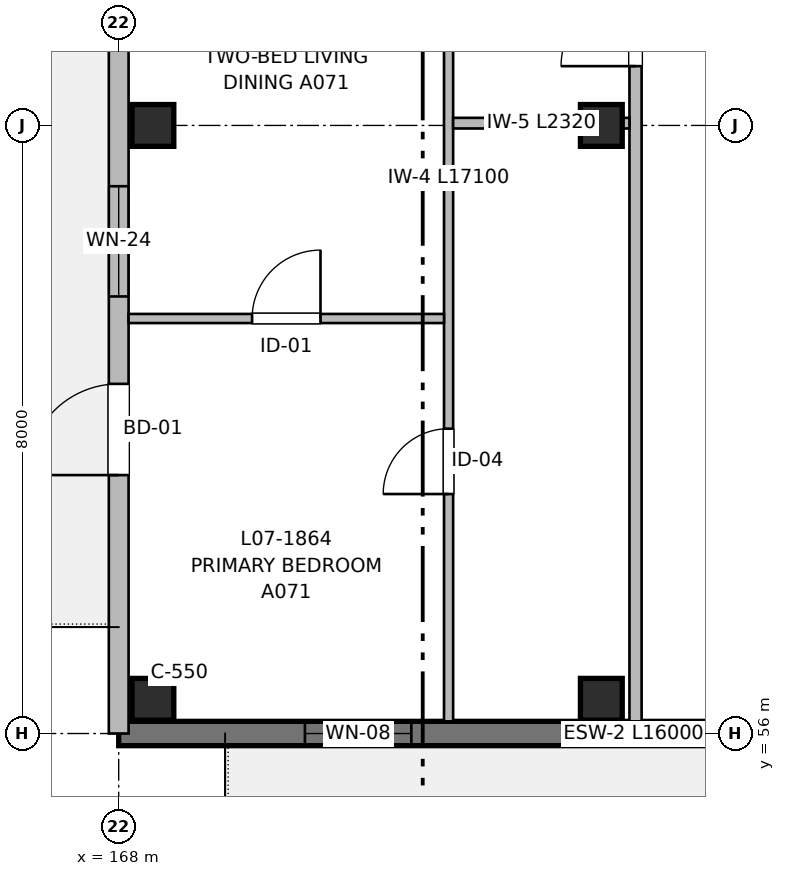
"""IFC4 building model, lengths in metres.
Left out: names, types, materials, properties, quantities, classifications, styles, units other than length and angle.
Written with IfcOpenShell. Run it as: python <this file> out.ifc"""

import sys

from ifc_helpers import new_model, si_unit, direction, frame, frame_2d, origin, origin_2d, place, context, subcontext, project, spatial, rectangle, extrude, element, fill, save


model = new_model("IFC4")
c1 = context("Model", 3, precision=1e-05, world=origin(), true_north=direction((0.0, 1.0)))
c2 = subcontext(c1, "Body", "Model", "MODEL_VIEW")
j1 = project(units=[si_unit("LENGTHUNIT", "METRE"), si_unit("PLANEANGLEUNIT", "RADIAN")], contexts=[c1])
p1 = place(None, origin())
s1 = spatial("IfcSite", under=j1, at=p1, CompositionType="ELEMENT")
p2 = place(p1, origin())
s2 = spatial("IfcBuilding", under=s1, at=p2, CompositionType="ELEMENT")
p3 = place(p2, frame((0.0, 0.0, 23.36)))
s3 = spatial("IfcBuildingStorey", under=s2, at=p3, CompositionType="ELEMENT", Elevation=23.36)
for number, where, z_axis, x_axis in (
    (1, (168.45, 56.45, 0.0), (0.0, 0.0, 1.0), (1.0, 0.0, 0.0)),
    (2, (168.45, 64.0, 0.0), (0.0, 0.0, 1.0), (1.0, 0.0, 0.0)),
    (3, (174.35, 56.45, 0.0), (0.0, 0.0, 1.0), (1.0, 0.0, 0.0)),
    (4, (174.35, 64.0, 0.0), (0.0, 0.0, 1.0), (1.0, 0.0, 0.0)),
):
    element("IfcColumn", number, at=place(p3, frame(where, z_axis=z_axis, x_axis=x_axis)), inside=s3, PredefinedType="COLUMN", context=c2, shape_type="SweptSolid", body=[
        extrude(rectangle(XDim=0.55, YDim=0.55, at=origin_2d()), origin(), (0.0, 0.0, 1.0), 3.2),
    ])
p4 = place(p3, frame((184.0, 56.0, 0.0), z_axis=(0.0, 0.0, 1.0), x_axis=(-1.0, 0.0, 0.0)))
e5 = element("IfcWall", 5, at=p4, inside=s3, PredefinedType="SHEAR", context=c2, shape_type="SweptSolid", body=[
    extrude(rectangle(XDim=16.0, YDim=0.32, at=frame_2d((8.0, 0.0))), origin(), (0.0, 0.0, 1.0), 2.98),
])
p5 = place(p4, frame((3.4, 0.0, 0.0)))
e6 = element("IfcOpeningElement", 6, at=p5, cuts=e5, PredefinedType="OPENING", context=c2, shape_type="SweptSolid", body=[
    extrude(rectangle(XDim=1.2, YDim=2.2, at=frame_2d((0.6, 1.1))), frame((0.0, 0.17, 0.0), z_axis=(0.0, -1.0, 0.0), x_axis=(1.0, 0.0, 0.0)), (0.0, 0.0, 1.0), 0.34),
])
p6 = place(p4, frame((4.85, 0.0, 0.77)))
e7 = element("IfcOpeningElement", 7, at=p6, cuts=e5, PredefinedType="OPENING", context=c2, shape_type="SweptSolid", body=[
    extrude(rectangle(XDim=1.45, YDim=1.45, at=frame_2d((0.725, 0.725))), frame((0.0, 0.17, 0.0), z_axis=(0.0, -1.0, 0.0), x_axis=(1.0, 0.0, 0.0)), (0.0, 0.0, 1.0), 0.34),
])
p7 = place(p4, frame((12.15, 0.0, 0.87)))
e8 = element("IfcOpeningElement", 8, at=p7, cuts=e5, PredefinedType="OPENING", context=c2, shape_type="SweptSolid", body=[
    extrude(rectangle(XDim=1.4, YDim=1.35, at=frame_2d((0.7, 0.675))), frame((0.0, 0.17, 0.0), z_axis=(0.0, -1.0, 0.0), x_axis=(1.0, 0.0, 0.0)), (0.0, 0.0, 1.0), 0.34),
])
p8 = place(p3, frame((168.0, 56.0, 0.0), z_axis=(0.0, 0.0, 1.0), x_axis=(0.0, 1.0, 0.0)))
e9 = element("IfcWall", 9, at=p8, inside=s3, PredefinedType="SOLIDWALL", context=c2, shape_type="SweptSolid", body=[
    extrude(rectangle(XDim=32.0, YDim=0.26, at=frame_2d((16.0, 0.0))), origin(), (0.0, 0.0, 1.0), 2.98),
])
p9 = place(p8, frame((3.4, 0.0, 0.0)))
e10 = element("IfcOpeningElement", 10, at=p9, cuts=e9, PredefinedType="OPENING", context=c2, shape_type="SweptSolid", body=[
    extrude(rectangle(XDim=1.2, YDim=2.2, at=frame_2d((0.6, 1.1))), frame((0.0, 0.14, 0.0), z_axis=(0.0, -1.0, 0.0), x_axis=(1.0, 0.0, 0.0)), (0.0, 0.0, 1.0), 0.28),
])
p10 = place(p8, frame((5.75, 0.0, 0.77)))
e11 = element("IfcOpeningElement", 11, at=p10, cuts=e9, PredefinedType="OPENING", context=c2, shape_type="SweptSolid", body=[
    extrude(rectangle(XDim=1.45, YDim=1.45, at=frame_2d((0.725, 0.725))), frame((0.0, 0.14, 0.0), z_axis=(0.0, -1.0, 0.0), x_axis=(1.0, 0.0, 0.0)), (0.0, 0.0, 1.0), 0.28),
])
p11 = place(p8, frame((10.45, 0.0, 0.87)))
e12 = element("IfcOpeningElement", 12, at=p11, cuts=e9, PredefinedType="OPENING", context=c2, shape_type="SweptSolid", body=[
    extrude(rectangle(XDim=1.4, YDim=1.35, at=frame_2d((0.7, 0.675))), frame((0.0, 0.14, 0.0), z_axis=(0.0, -1.0, 0.0), x_axis=(1.0, 0.0, 0.0)), (0.0, 0.0, 1.0), 0.28),
])
p12 = place(p8, frame((19.375, 0.0, 0.87)))
e13 = element("IfcOpeningElement", 13, at=p12, cuts=e9, PredefinedType="OPENING", context=c2, shape_type="SweptSolid", body=[
    extrude(rectangle(XDim=1.25, YDim=1.35, at=frame_2d((0.625, 0.675))), frame((0.0, 0.14, 0.0), z_axis=(0.0, -1.0, 0.0), x_axis=(1.0, 0.0, 0.0)), (0.0, 0.0, 1.0), 0.28),
])
p13 = place(p8, frame((27.35, 0.0, 0.82)))
e14 = element("IfcOpeningElement", 14, at=p13, cuts=e9, PredefinedType="OPENING", context=c2, shape_type="SweptSolid", body=[
    extrude(rectangle(XDim=1.3, YDim=1.4, at=frame_2d((0.65, 0.7))), frame((0.0, 0.14, 0.0), z_axis=(0.0, -1.0, 0.0), x_axis=(1.0, 0.0, 0.0)), (0.0, 0.0, 1.0), 0.28),
])
p14 = place(p8, frame((14.055, 0.0, 0.82)))
e15 = element("IfcOpeningElement", 15, at=p14, cuts=e9, PredefinedType="OPENING", context=c2, shape_type="SweptSolid", body=[
    extrude(rectangle(XDim=1.5, YDim=1.4, at=frame_2d((0.75, 0.7))), frame((0.0, 0.14, 0.0), z_axis=(0.0, -1.0, 0.0), x_axis=(1.0, 0.0, 0.0)), (0.0, 0.0, 1.0), 0.28),
])
p15 = place(p8, frame((29.945, 0.0, 0.82)))
e16 = element("IfcOpeningElement", 16, at=p15, cuts=e9, PredefinedType="OPENING", context=c2, shape_type="SweptSolid", body=[
    extrude(rectangle(XDim=1.5, YDim=1.4, at=frame_2d((0.75, 0.7))), frame((0.0, 0.14, 0.0), z_axis=(0.0, -1.0, 0.0), x_axis=(1.0, 0.0, 0.0)), (0.0, 0.0, 1.0), 0.28),
])
p16 = place(p3, frame((174.8, 56.16, 0.0), z_axis=(0.0, 0.0, 1.0), x_axis=(0.0, 1.0, 0.0)))
e17 = element("IfcWall", 17, at=p16, inside=s3, PredefinedType="PARTITIONING", context=c2, shape_type="SweptSolid", body=[
    extrude(rectangle(XDim=50.64, YDim=0.16, at=frame_2d((25.32, 0.0))), origin(), (0.0, 0.0, 1.0), 2.935),
])
p17 = place(p16, frame((8.62, 0.0, 0.0)))
e18 = element("IfcOpeningElement", 18, at=p17, cuts=e17, PredefinedType="OPENING", context=c2, shape_type="SweptSolid", body=[
    extrude(rectangle(XDim=0.98, YDim=2.15, at=frame_2d((0.49, 1.075))), frame((0.0, 0.09, 0.0), z_axis=(0.0, -1.0, 0.0), x_axis=(1.0, 0.0, 0.0)), (0.0, 0.0, 1.0), 0.18),
])
p18 = place(p16, frame((25.85, 0.0, 0.0)))
e19 = element("IfcOpeningElement", 19, at=p18, cuts=e17, PredefinedType="OPENING", context=c2, shape_type="SweptSolid", body=[
    extrude(rectangle(XDim=1.02, YDim=2.15, at=frame_2d((0.51, 1.075))), frame((0.0, 0.09, 0.0), z_axis=(0.0, -1.0, 0.0), x_axis=(1.0, 0.0, 0.0)), (0.0, 0.0, 1.0), 0.18),
])
p19 = place(p16, frame((42.62, 0.0, 0.0)))
e20 = element("IfcOpeningElement", 20, at=p19, cuts=e17, PredefinedType="OPENING", context=c2, shape_type="SweptSolid", body=[
    extrude(rectangle(XDim=0.98, YDim=2.15, at=frame_2d((0.49, 1.075))), frame((0.0, 0.09, 0.0), z_axis=(0.0, -1.0, 0.0), x_axis=(1.0, 0.0, 0.0)), (0.0, 0.0, 1.0), 0.18),
])
p20 = place(p3, frame((172.34, 56.16, 0.0), z_axis=(0.0, 0.0, 1.0), x_axis=(0.0, 1.0, 0.0)))
e21 = element("IfcWall", 21, at=p20, inside=s3, PredefinedType="PARTITIONING", context=c2, shape_type="SweptSolid", body=[
    extrude(rectangle(XDim=17.1, YDim=0.12, at=frame_2d((8.55, 0.0))), origin(), (0.0, 0.0, 1.0), 2.935),
])
p21 = place(p20, frame((2.99, 0.0, 0.0)))
e22 = element("IfcOpeningElement", 22, at=p21, cuts=e21, PredefinedType="OPENING", context=c2, shape_type="SweptSolid", body=[
    extrude(rectangle(XDim=0.86, YDim=2.1, at=frame_2d((0.43, 1.05))), frame((0.0, 0.07, 0.0), z_axis=(0.0, -1.0, 0.0), x_axis=(1.0, 0.0, 0.0)), (0.0, 0.0, 1.0), 0.14),
])
p22 = place(p20, frame((10.454, 0.0, 0.0)))
e23 = element("IfcOpeningElement", 23, at=p22, cuts=e21, PredefinedType="OPENING", context=c2, shape_type="SweptSolid", body=[
    extrude(rectangle(XDim=0.92, YDim=2.1, at=frame_2d((0.46, 1.05))), frame((0.0, 0.07, 0.0), z_axis=(0.0, -1.0, 0.0), x_axis=(1.0, 0.0, 0.0)), (0.0, 0.0, 1.0), 0.14),
])
p23 = place(p3, frame((172.4, 64.03, 0.0), z_axis=(0.0, 0.0, 1.0), x_axis=(1.0, 0.0, 0.0)))
e24 = element("IfcWall", 24, at=p23, inside=s3, PredefinedType="PARTITIONING", context=c2, shape_type="SweptSolid", body=[
    extrude(rectangle(XDim=2.32, YDim=0.14, at=frame_2d((1.16, 0.0))), origin(), (0.0, 0.0, 1.0), 2.53),
])
p24 = place(p3, frame((168.13, 61.46, 0.0), z_axis=(0.0, 0.0, 1.0), x_axis=(1.0, 0.0, 0.0)))
e25 = element("IfcWall", 25, at=p24, inside=s3, PredefinedType="PARTITIONING", context=c2, shape_type="SweptSolid", body=[
    extrude(rectangle(XDim=4.15, YDim=0.12, at=frame_2d((2.075, 0.0))), origin(), (0.0, 0.0, 1.0), 2.935),
])
p25 = place(p24, frame((1.625, 0.0, 0.0)))
e26 = element("IfcOpeningElement", 26, at=p25, cuts=e25, PredefinedType="OPENING", context=c2, shape_type="SweptSolid", body=[
    extrude(rectangle(XDim=0.9, YDim=2.1, at=frame_2d((0.45, 1.05))), frame((0.0, 0.07, 0.0), z_axis=(0.0, -1.0, 0.0), x_axis=(1.0, 0.0, 0.0)), (0.0, 0.0, 1.0), 0.14),
])
p26 = place(p7, origin())
e27 = element("IfcWindow", 27, at=p26, inside=s3, PartitioningType="SINGLE_PANEL", PredefinedType="WINDOW", context=c2, shape_type="SweptSolid", body=[
    extrude(rectangle(XDim=1.4, YDim=1.35, at=frame_2d((0.7, 0.675))), frame((0.0, 0.03, 0.0), z_axis=(0.0, -1.0, 0.0), x_axis=(1.0, 0.0, 0.0)), (0.0, 0.0, 1.0), 0.06),
])
fill(e8, e27)
p27 = place(p9, origin())
e28 = element("IfcDoor", 28, at=p27, inside=s3, OperationType="SINGLE_SWING_LEFT", PredefinedType="DOOR", context=c2, shape_type="SweptSolid", body=[
    extrude(rectangle(XDim=1.2, YDim=2.2, at=frame_2d((0.6, 1.1))), frame((0.0, 0.025, 0.0), z_axis=(0.0, -1.0, 0.0), x_axis=(1.0, 0.0, 0.0)), (0.0, 0.0, 1.0), 0.05),
])
fill(e10, e28)
p28 = place(p10, origin())
e29 = element("IfcWindow", 29, at=p28, inside=s3, PartitioningType="SINGLE_PANEL", PredefinedType="WINDOW", context=c2, shape_type="SweptSolid", body=[
    extrude(rectangle(XDim=1.45, YDim=1.45, at=frame_2d((0.725, 0.725))), frame((0.0, 0.03, 0.0), z_axis=(0.0, -1.0, 0.0), x_axis=(1.0, 0.0, 0.0)), (0.0, 0.0, 1.0), 0.06),
])
fill(e11, e29)
p29 = place(p21, origin())
e30 = element("IfcDoor", 30, at=p29, inside=s3, OperationType="SINGLE_SWING_LEFT", PredefinedType="DOOR", context=c2, shape_type="SweptSolid", body=[
    extrude(rectangle(XDim=0.86, YDim=2.1, at=frame_2d((0.43, 1.05))), frame((0.0, 0.025, 0.0), z_axis=(0.0, -1.0, 0.0), x_axis=(1.0, 0.0, 0.0)), (0.0, 0.0, 1.0), 0.05),
])
fill(e22, e30)
p30 = place(p17, origin())
e31 = element("IfcDoor", 31, at=p30, inside=s3, OperationType="SINGLE_SWING_LEFT", PredefinedType="DOOR", context=c2, shape_type="SweptSolid", body=[
    extrude(rectangle(XDim=0.98, YDim=2.15, at=frame_2d((0.49, 1.075))), frame((0.0, 0.025, 0.0), z_axis=(0.0, -1.0, 0.0), x_axis=(1.0, 0.0, 0.0)), (0.0, 0.0, 1.0), 0.05),
])
fill(e18, e31)
p31 = place(p25, origin())
e32 = element("IfcDoor", 32, at=p31, inside=s3, OperationType="SINGLE_SWING_RIGHT", PredefinedType="DOOR", context=c2, shape_type="SweptSolid", body=[
    extrude(rectangle(XDim=0.9, YDim=2.1, at=frame_2d((0.45, 1.05))), frame((0.0, 0.025, 0.0), z_axis=(0.0, -1.0, 0.0), x_axis=(1.0, 0.0, 0.0)), (0.0, 0.0, 1.0), 0.05),
])
fill(e26, e32)
save(model, sys.argv[1])
